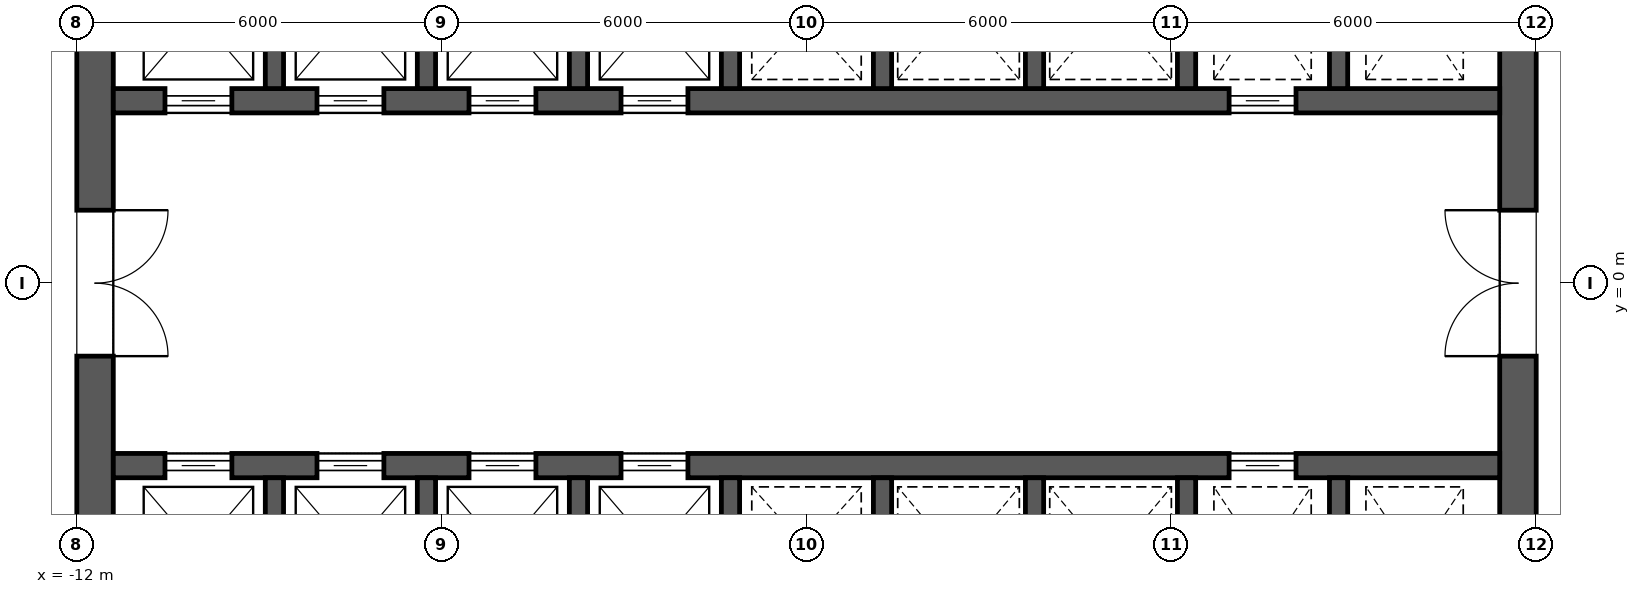
"""IFC4 building model, lengths in metres.
Left out: names, types, materials, properties, quantities, classifications, styles, units other than length and angle.
Written with IfcOpenShell. Run it as: python <this file> out.ifc"""

import sys

from ifc_helpers import new_model, si_unit, direction, frame, frame_2d, origin, place, context, subcontext, project, spatial, rectangle, extrude, element, fill, save


model = new_model("IFC4")
c1 = context("Model", 3, precision=1e-05, world=origin(), true_north=direction((0.0, 1.0)))
c2 = subcontext(c1, "Body", "Model", "MODEL_VIEW")
j1 = project(units=[si_unit("LENGTHUNIT", "METRE"), si_unit("PLANEANGLEUNIT", "RADIAN")], contexts=[c1])
p1 = place(None, origin())
s1 = spatial("IfcSite", under=j1, at=p1, CompositionType="ELEMENT")
p2 = place(p1, origin())
s2 = spatial("IfcBuilding", under=s1, at=p2, CompositionType="ELEMENT")
p3 = place(p2, frame((0.0, 0.0, 125.5)))
s3 = spatial("IfcBuildingStorey", under=s2, at=p3, CompositionType="ELEMENT", Elevation=125.5)
p4 = place(p3, frame((11.7, -11.4, 0.0), z_axis=(0.0, 0.0, 1.0), x_axis=(0.0, 1.0, 0.0)))
e1 = element("IfcWall", 1, at=p4, inside=s3, PredefinedType="SHEAR", context=c2, shape_type="SweptSolid", body=[
    extrude(rectangle(XDim=22.8, YDim=0.6, at=frame_2d((11.4, 0.0))), origin(), (0.0, 0.0, 1.0), 4.2),
])
p5 = place(p4, frame((10.2, 0.0, 0.0)))
e2 = element("IfcOpeningElement", 2, at=p5, cuts=e1, PredefinedType="OPENING", context=c2, shape_type="SweptSolid", body=[
    extrude(rectangle(XDim=2.4, YDim=2.1, at=frame_2d((1.2, 1.05))), frame((0.0, 0.312, 0.0), z_axis=(0.0, -1.0, 0.0), x_axis=(1.0, 0.0, 0.0)), (0.0, 0.0, 1.0), 0.624),
])
p6 = place(p4, frame((19.5, 0.0, 0.0)))
e3 = element("IfcOpeningElement", 3, at=p6, cuts=e1, PredefinedType="OPENING", context=c2, shape_type="SweptSolid", body=[
    extrude(rectangle(XDim=1.2, YDim=2.1, at=frame_2d((0.6, 1.05))), frame((0.0, 0.312, 0.0), z_axis=(0.0, -1.0, 0.0), x_axis=(1.0, 0.0, 0.0)), (0.0, 0.0, 1.0), 0.624),
])
p7 = place(p4, frame((2.1, 0.0, 0.0)))
e4 = element("IfcOpeningElement", 4, at=p7, cuts=e1, PredefinedType="OPENING", context=c2, shape_type="SweptSolid", body=[
    extrude(rectangle(XDim=1.2, YDim=2.1, at=frame_2d((0.6, 1.05))), frame((0.0, 0.312, 0.0), z_axis=(0.0, -1.0, 0.0), x_axis=(1.0, 0.0, 0.0)), (0.0, 0.0, 1.0), 0.624),
])
p8 = place(p3, frame((-11.7, -11.4, 0.0), z_axis=(0.0, 0.0, 1.0), x_axis=(0.0, 1.0, 0.0)))
e5 = element("IfcWall", 5, at=p8, inside=s3, PredefinedType="SHEAR", context=c2, shape_type="SweptSolid", body=[
    extrude(rectangle(XDim=22.8, YDim=0.6, at=frame_2d((11.4, 0.0))), origin(), (0.0, 0.0, 1.0), 4.2),
])
p9 = place(p8, frame((10.2, 0.0, 0.0)))
e6 = element("IfcOpeningElement", 6, at=p9, cuts=e5, PredefinedType="OPENING", context=c2, shape_type="SweptSolid", body=[
    extrude(rectangle(XDim=2.4, YDim=2.1, at=frame_2d((1.2, 1.05))), frame((0.0, 0.312, 0.0), z_axis=(0.0, -1.0, 0.0), x_axis=(1.0, 0.0, 0.0)), (0.0, 0.0, 1.0), 0.624),
])
p10 = place(p8, frame((18.925, 0.0, 0.0)))
e7 = element("IfcOpeningElement", 7, at=p10, cuts=e5, PredefinedType="OPENING", context=c2, shape_type="SweptSolid", body=[
    extrude(rectangle(XDim=1.2, YDim=2.1, at=frame_2d((0.6, 1.05))), frame((0.0, 0.312, 0.0), z_axis=(0.0, -1.0, 0.0), x_axis=(1.0, 0.0, 0.0)), (0.0, 0.0, 1.0), 0.624),
])
p11 = place(p8, frame((2.675, 0.0, 0.0)))
e8 = element("IfcOpeningElement", 8, at=p11, cuts=e5, PredefinedType="OPENING", context=c2, shape_type="SweptSolid", body=[
    extrude(rectangle(XDim=1.2, YDim=2.1, at=frame_2d((0.6, 1.05))), frame((0.0, 0.312, 0.0), z_axis=(0.0, -1.0, 0.0), x_axis=(1.0, 0.0, 0.0)), (0.0, 0.0, 1.0), 0.624),
])
p12 = place(p3, frame((-11.4, 3.0, 0.0), z_axis=(0.0, 0.0, 1.0), x_axis=(1.0, 0.0, 0.0)))
e9 = element("IfcWall", 9, at=p12, inside=s3, PredefinedType="SHEAR", context=c2, shape_type="SweptSolid", body=[
    extrude(rectangle(XDim=22.8, YDim=0.4, at=frame_2d((11.4, 0.0))), origin(), (0.0, 0.0, 1.0), 4.2),
])
p13 = place(p12, frame((0.85, 0.0, 0.0)))
e10 = element("IfcOpeningElement", 10, at=p13, cuts=e9, PredefinedType="OPENING", context=c2, shape_type="SweptSolid", body=[
    extrude(rectangle(XDim=1.1, YDim=2.1, at=frame_2d((0.55, 1.05))), frame((0.0, 0.212, 0.0), z_axis=(0.0, -1.0, 0.0), x_axis=(1.0, 0.0, 0.0)), (0.0, 0.0, 1.0), 0.424),
])
p14 = place(p12, frame((3.35, 0.0, 0.0)))
e11 = element("IfcOpeningElement", 11, at=p14, cuts=e9, PredefinedType="OPENING", context=c2, shape_type="SweptSolid", body=[
    extrude(rectangle(XDim=1.1, YDim=2.1, at=frame_2d((0.55, 1.05))), frame((0.0, 0.212, 0.0), z_axis=(0.0, -1.0, 0.0), x_axis=(1.0, 0.0, 0.0)), (0.0, 0.0, 1.0), 0.424),
])
p15 = place(p12, frame((5.85, 0.0, 0.0)))
e12 = element("IfcOpeningElement", 12, at=p15, cuts=e9, PredefinedType="OPENING", context=c2, shape_type="SweptSolid", body=[
    extrude(rectangle(XDim=1.1, YDim=2.1, at=frame_2d((0.55, 1.05))), frame((0.0, 0.212, 0.0), z_axis=(0.0, -1.0, 0.0), x_axis=(1.0, 0.0, 0.0)), (0.0, 0.0, 1.0), 0.424),
])
p16 = place(p12, frame((8.35, 0.0, 0.0)))
e13 = element("IfcOpeningElement", 13, at=p16, cuts=e9, PredefinedType="OPENING", context=c2, shape_type="SweptSolid", body=[
    extrude(rectangle(XDim=1.1, YDim=2.1, at=frame_2d((0.55, 1.05))), frame((0.0, 0.212, 0.0), z_axis=(0.0, -1.0, 0.0), x_axis=(1.0, 0.0, 0.0)), (0.0, 0.0, 1.0), 0.424),
])
p17 = place(p12, frame((18.35, 0.0, 0.0)))
e14 = element("IfcOpeningElement", 14, at=p17, cuts=e9, PredefinedType="OPENING", context=c2, shape_type="SweptSolid", body=[
    extrude(rectangle(XDim=1.1, YDim=2.1, at=frame_2d((0.55, 1.05))), frame((0.0, 0.212, 0.0), z_axis=(0.0, -1.0, 0.0), x_axis=(1.0, 0.0, 0.0)), (0.0, 0.0, 1.0), 0.424),
])
for number, where, z_axis, x_axis in (
    (15, (-8.75, 3.2, 0.0), (0.0, 0.0, 1.0), (0.0, 1.0, 0.0)),
    (16, (-6.25, 3.2, 0.0), (0.0, 0.0, 1.0), (0.0, 1.0, 0.0)),
    (17, (-3.75, 3.2, 0.0), (0.0, 0.0, 1.0), (0.0, 1.0, 0.0)),
    (18, (-1.25, 3.2, 0.0), (0.0, 0.0, 1.0), (0.0, 1.0, 0.0)),
    (19, (1.25, 3.2, 0.0), (0.0, 0.0, 1.0), (0.0, 1.0, 0.0)),
    (20, (3.75, 3.2, 0.0), (0.0, 0.0, 1.0), (0.0, 1.0, 0.0)),
    (21, (6.25, 3.2, 0.0), (0.0, 0.0, 1.0), (0.0, 1.0, 0.0)),
    (22, (8.75, 3.2, 0.0), (0.0, 0.0, 1.0), (0.0, 1.0, 0.0)),
):
    element("IfcWall", number, at=place(p3, frame(where, z_axis=z_axis, x_axis=x_axis)), inside=s3, PredefinedType="SHEAR", context=c2, shape_type="SweptSolid", body=[
        extrude(rectangle(XDim=2.9, YDim=0.3, at=frame_2d((1.45, 0.0))), origin(), (0.0, 0.0, 1.0), 4.2),
    ])
p18 = place(p3, frame((-11.4, -3.0, 0.0), z_axis=(0.0, 0.0, 1.0), x_axis=(1.0, 0.0, 0.0)))
e23 = element("IfcWall", 23, at=p18, inside=s3, PredefinedType="SHEAR", context=c2, shape_type="SweptSolid", body=[
    extrude(rectangle(XDim=22.8, YDim=0.4, at=frame_2d((11.4, 0.0))), origin(), (0.0, 0.0, 1.0), 4.2),
])
p19 = place(p18, frame((0.85, 0.0, 0.0)))
e24 = element("IfcOpeningElement", 24, at=p19, cuts=e23, PredefinedType="OPENING", context=c2, shape_type="SweptSolid", body=[
    extrude(rectangle(XDim=1.1, YDim=2.1, at=frame_2d((0.55, 1.05))), frame((0.0, 0.212, 0.0), z_axis=(0.0, -1.0, 0.0), x_axis=(1.0, 0.0, 0.0)), (0.0, 0.0, 1.0), 0.424),
])
p20 = place(p18, frame((3.35, 0.0, 0.0)))
e25 = element("IfcOpeningElement", 25, at=p20, cuts=e23, PredefinedType="OPENING", context=c2, shape_type="SweptSolid", body=[
    extrude(rectangle(XDim=1.1, YDim=2.1, at=frame_2d((0.55, 1.05))), frame((0.0, 0.212, 0.0), z_axis=(0.0, -1.0, 0.0), x_axis=(1.0, 0.0, 0.0)), (0.0, 0.0, 1.0), 0.424),
])
p21 = place(p18, frame((5.85, 0.0, 0.0)))
e26 = element("IfcOpeningElement", 26, at=p21, cuts=e23, PredefinedType="OPENING", context=c2, shape_type="SweptSolid", body=[
    extrude(rectangle(XDim=1.1, YDim=2.1, at=frame_2d((0.55, 1.05))), frame((0.0, 0.212, 0.0), z_axis=(0.0, -1.0, 0.0), x_axis=(1.0, 0.0, 0.0)), (0.0, 0.0, 1.0), 0.424),
])
p22 = place(p18, frame((8.35, 0.0, 0.0)))
e27 = element("IfcOpeningElement", 27, at=p22, cuts=e23, PredefinedType="OPENING", context=c2, shape_type="SweptSolid", body=[
    extrude(rectangle(XDim=1.1, YDim=2.1, at=frame_2d((0.55, 1.05))), frame((0.0, 0.212, 0.0), z_axis=(0.0, -1.0, 0.0), x_axis=(1.0, 0.0, 0.0)), (0.0, 0.0, 1.0), 0.424),
])
p23 = place(p18, frame((18.35, 0.0, 0.0)))
e28 = element("IfcOpeningElement", 28, at=p23, cuts=e23, PredefinedType="OPENING", context=c2, shape_type="SweptSolid", body=[
    extrude(rectangle(XDim=1.1, YDim=2.1, at=frame_2d((0.55, 1.05))), frame((0.0, 0.212, 0.0), z_axis=(0.0, -1.0, 0.0), x_axis=(1.0, 0.0, 0.0)), (0.0, 0.0, 1.0), 0.424),
])
for number, where, z_axis, x_axis in (
    (29, (-8.75, -6.1, 0.0), (0.0, 0.0, 1.0), (0.0, 1.0, 0.0)),
    (30, (-6.25, -6.1, 0.0), (0.0, 0.0, 1.0), (0.0, 1.0, 0.0)),
    (31, (-3.75, -6.1, 0.0), (0.0, 0.0, 1.0), (0.0, 1.0, 0.0)),
    (32, (-1.25, -6.1, 0.0), (0.0, 0.0, 1.0), (0.0, 1.0, 0.0)),
    (33, (1.25, -6.1, 0.0), (0.0, 0.0, 1.0), (0.0, 1.0, 0.0)),
    (34, (3.75, -6.1, 0.0), (0.0, 0.0, 1.0), (0.0, 1.0, 0.0)),
    (35, (6.25, -6.1, 0.0), (0.0, 0.0, 1.0), (0.0, 1.0, 0.0)),
    (36, (8.75, -6.1, 0.0), (0.0, 0.0, 1.0), (0.0, 1.0, 0.0)),
):
    element("IfcWall", number, at=place(p3, frame(where, z_axis=z_axis, x_axis=x_axis)), inside=s3, PredefinedType="SHEAR", context=c2, shape_type="SweptSolid", body=[
        extrude(rectangle(XDim=2.9, YDim=0.3, at=frame_2d((1.45, 0.0))), origin(), (0.0, 0.0, 1.0), 4.2),
    ])
p24 = place(p13, origin())
e37 = element("IfcDoor", 37, at=p24, inside=s3, OperationType="SLIDING_TO_LEFT", PredefinedType="DOOR", context=c2, shape_type="SweptSolid", body=[
    extrude(rectangle(XDim=1.1, YDim=2.1, at=frame_2d((0.55, 1.05))), frame((0.0, 0.025, 0.0), z_axis=(0.0, -1.0, 0.0), x_axis=(1.0, 0.0, 0.0)), (0.0, 0.0, 1.0), 0.05),
])
fill(e10, e37)
p25 = place(p14, origin())
e38 = element("IfcDoor", 38, at=p25, inside=s3, OperationType="SLIDING_TO_LEFT", PredefinedType="DOOR", context=c2, shape_type="SweptSolid", body=[
    extrude(rectangle(XDim=1.1, YDim=2.1, at=frame_2d((0.55, 1.05))), frame((0.0, 0.025, 0.0), z_axis=(0.0, -1.0, 0.0), x_axis=(1.0, 0.0, 0.0)), (0.0, 0.0, 1.0), 0.05),
])
fill(e11, e38)
p26 = place(p15, origin())
e39 = element("IfcDoor", 39, at=p26, inside=s3, OperationType="SLIDING_TO_LEFT", PredefinedType="DOOR", context=c2, shape_type="SweptSolid", body=[
    extrude(rectangle(XDim=1.1, YDim=2.1, at=frame_2d((0.55, 1.05))), frame((0.0, 0.025, 0.0), z_axis=(0.0, -1.0, 0.0), x_axis=(1.0, 0.0, 0.0)), (0.0, 0.0, 1.0), 0.05),
])
fill(e12, e39)
p27 = place(p16, origin())
e40 = element("IfcDoor", 40, at=p27, inside=s3, OperationType="SLIDING_TO_LEFT", PredefinedType="DOOR", context=c2, shape_type="SweptSolid", body=[
    extrude(rectangle(XDim=1.1, YDim=2.1, at=frame_2d((0.55, 1.05))), frame((0.0, 0.025, 0.0), z_axis=(0.0, -1.0, 0.0), x_axis=(1.0, 0.0, 0.0)), (0.0, 0.0, 1.0), 0.05),
])
fill(e13, e40)
p28 = place(p19, origin())
e41 = element("IfcDoor", 41, at=p28, inside=s3, OperationType="SLIDING_TO_LEFT", PredefinedType="DOOR", context=c2, shape_type="SweptSolid", body=[
    extrude(rectangle(XDim=1.1, YDim=2.1, at=frame_2d((0.55, 1.05))), frame((0.0, 0.025, 0.0), z_axis=(0.0, -1.0, 0.0), x_axis=(1.0, 0.0, 0.0)), (0.0, 0.0, 1.0), 0.05),
])
fill(e24, e41)
p29 = place(p20, origin())
e42 = element("IfcDoor", 42, at=p29, inside=s3, OperationType="SLIDING_TO_LEFT", PredefinedType="DOOR", context=c2, shape_type="SweptSolid", body=[
    extrude(rectangle(XDim=1.1, YDim=2.1, at=frame_2d((0.55, 1.05))), frame((0.0, 0.025, 0.0), z_axis=(0.0, -1.0, 0.0), x_axis=(1.0, 0.0, 0.0)), (0.0, 0.0, 1.0), 0.05),
])
fill(e25, e42)
p30 = place(p21, origin())
e43 = element("IfcDoor", 43, at=p30, inside=s3, OperationType="SLIDING_TO_LEFT", PredefinedType="DOOR", context=c2, shape_type="SweptSolid", body=[
    extrude(rectangle(XDim=1.1, YDim=2.1, at=frame_2d((0.55, 1.05))), frame((0.0, 0.025, 0.0), z_axis=(0.0, -1.0, 0.0), x_axis=(1.0, 0.0, 0.0)), (0.0, 0.0, 1.0), 0.05),
])
fill(e26, e43)
p31 = place(p22, origin())
e44 = element("IfcDoor", 44, at=p31, inside=s3, OperationType="SLIDING_TO_LEFT", PredefinedType="DOOR", context=c2, shape_type="SweptSolid", body=[
    extrude(rectangle(XDim=1.1, YDim=2.1, at=frame_2d((0.55, 1.05))), frame((0.0, 0.025, 0.0), z_axis=(0.0, -1.0, 0.0), x_axis=(1.0, 0.0, 0.0)), (0.0, 0.0, 1.0), 0.05),
])
fill(e27, e44)
p32 = place(p17, origin())
e45 = element("IfcDoor", 45, at=p32, inside=s3, OperationType="SLIDING_TO_LEFT", PredefinedType="DOOR", context=c2, shape_type="SweptSolid", body=[
    extrude(rectangle(XDim=1.1, YDim=2.1, at=frame_2d((0.55, 1.05))), frame((0.0, 0.025, 0.0), z_axis=(0.0, -1.0, 0.0), x_axis=(1.0, 0.0, 0.0)), (0.0, 0.0, 1.0), 0.05),
])
fill(e14, e45)
p33 = place(p23, origin())
e46 = element("IfcDoor", 46, at=p33, inside=s3, OperationType="SLIDING_TO_LEFT", PredefinedType="DOOR", context=c2, shape_type="SweptSolid", body=[
    extrude(rectangle(XDim=1.1, YDim=2.1, at=frame_2d((0.55, 1.05))), frame((0.0, 0.025, 0.0), z_axis=(0.0, -1.0, 0.0), x_axis=(1.0, 0.0, 0.0)), (0.0, 0.0, 1.0), 0.05),
])
fill(e28, e46)
p34 = place(p9, frame((2.4, 0.0, 0.0), z_axis=(0.0, 0.0, 1.0), x_axis=(-1.0, 0.0, 0.0)))
e47 = element("IfcDoor", 47, at=p34, inside=s3, OperationType="DOUBLE_DOOR_SINGLE_SWING", PredefinedType="DOOR", context=c2, shape_type="SweptSolid", body=[
    extrude(rectangle(XDim=2.4, YDim=2.1, at=frame_2d((1.2, 1.05))), frame((0.0, 0.025, 0.0), z_axis=(0.0, -1.0, 0.0), x_axis=(1.0, 0.0, 0.0)), (0.0, 0.0, 1.0), 0.05),
])
fill(e6, e47)
p35 = place(p5, origin())
e48 = element("IfcDoor", 48, at=p35, inside=s3, OperationType="DOUBLE_DOOR_SINGLE_SWING", PredefinedType="DOOR", context=c2, shape_type="SweptSolid", body=[
    extrude(rectangle(XDim=2.4, YDim=2.1, at=frame_2d((1.2, 1.05))), frame((0.0, 0.025, 0.0), z_axis=(0.0, -1.0, 0.0), x_axis=(1.0, 0.0, 0.0)), (0.0, 0.0, 1.0), 0.05),
])
fill(e2, e48)
save(model, sys.argv[1])
